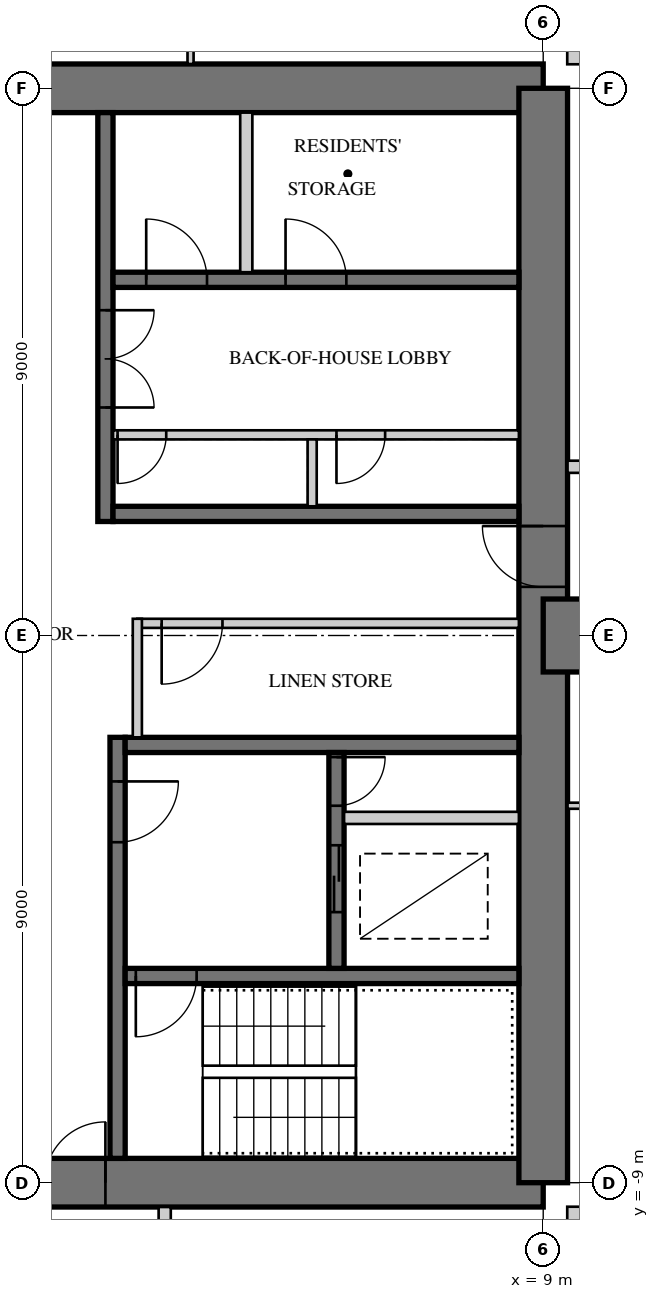
"""IFC4 building model, lengths in metres.
Left out: names, types, materials, properties, quantities, classifications, styles, units other than length and angle.
Written with IfcOpenShell. Run it as: python <this file> out.ifc"""

import sys

from ifc_helpers import new_model, si_unit, direction, frame, frame_2d, origin, place, context, subcontext, project, spatial, rectangle, extrude, element, fill, save


model = new_model("IFC4")
c1 = context("Model", 3, precision=1e-05, world=origin(), true_north=direction((0.0, 1.0)))
c2 = subcontext(c1, "Body", "Model", "MODEL_VIEW")
j1 = project(units=[si_unit("LENGTHUNIT", "METRE"), si_unit("PLANEANGLEUNIT", "RADIAN")], contexts=[c1])
p1 = place(None, origin())
s1 = spatial("IfcSite", under=j1, at=p1, CompositionType="ELEMENT")
p2 = place(p1, origin())
s2 = spatial("IfcBuilding", under=s1, at=p2, CompositionType="ELEMENT")
p3 = place(p2, frame((0.0, 0.0, 222.1)))
s3 = spatial("IfcBuildingStorey", under=s2, at=p3, CompositionType="ELEMENT", Elevation=222.1)
p4 = place(p3, frame((9.0, 9.0, 0.0), z_axis=(0.0, 0.0, 1.0), x_axis=(-1.0, 0.0, 0.0)))
e1 = element("IfcWall", 1, at=p4, inside=s3, PredefinedType="SHEAR", context=c2, shape_type="SweptSolid", body=[
    extrude(rectangle(XDim=18.0, YDim=0.8, at=frame_2d((9.0, 0.0))), origin(), (0.0, 0.0, 1.0), 3.4),
])
p5 = place(p4, frame((9.8, 0.0, 0.0)))
e2 = element("IfcOpeningElement", 2, at=p5, cuts=e1, PredefinedType="OPENING", context=c2, shape_type="SweptSolid", body=[
    extrude(rectangle(XDim=1.0, YDim=2.4, at=frame_2d((0.5, 1.2))), frame((0.0, 0.41, 0.0), z_axis=(0.0, -1.0, 0.0), x_axis=(1.0, 0.0, 0.0)), (0.0, 0.0, 1.0), 0.82),
])
p6 = place(p3, frame((-9.0, -9.0, 0.0), z_axis=(0.0, 0.0, 1.0), x_axis=(1.0, 0.0, 0.0)))
e3 = element("IfcWall", 3, at=p6, inside=s3, PredefinedType="SHEAR", context=c2, shape_type="SweptSolid", body=[
    extrude(rectangle(XDim=18.0, YDim=0.8, at=frame_2d((9.0, 0.0))), origin(), (0.0, 0.0, 1.0), 3.4),
])
p7 = place(p6, frame((9.8, 0.0, 0.0)))
e4 = element("IfcOpeningElement", 4, at=p7, cuts=e3, PredefinedType="OPENING", context=c2, shape_type="SweptSolid", body=[
    extrude(rectangle(XDim=1.0, YDim=2.4, at=frame_2d((0.5, 1.2))), frame((0.0, 0.41, 0.0), z_axis=(0.0, -1.0, 0.0), x_axis=(1.0, 0.0, 0.0)), (0.0, 0.0, 1.0), 0.82),
])
p8 = place(p3, frame((9.0, -9.0, 0.0), z_axis=(0.0, 0.0, 1.0), x_axis=(0.0, 1.0, 0.0)))
e5 = element("IfcWall", 5, at=p8, inside=s3, PredefinedType="SHEAR", context=c2, shape_type="SweptSolid", body=[
    extrude(rectangle(XDim=18.0, YDim=0.8, at=frame_2d((9.0, 0.0))), origin(), (0.0, 0.0, 1.0), 3.4),
])
p9 = place(p8, frame((9.8, 0.0, 0.0)))
e6 = element("IfcOpeningElement", 6, at=p9, cuts=e5, PredefinedType="OPENING", context=c2, shape_type="SweptSolid", body=[
    extrude(rectangle(XDim=1.0, YDim=2.4, at=frame_2d((0.5, 1.2))), frame((0.0, 0.41, 0.0), z_axis=(0.0, -1.0, 0.0), x_axis=(1.0, 0.0, 0.0)), (0.0, 0.0, 1.0), 0.82),
])
p10 = place(p3, frame((1.8, 1.875, 0.0), z_axis=(0.0, 0.0, 1.0), x_axis=(0.0, 1.0, 0.0)))
e7 = element("IfcWall", 7, at=p10, inside=s3, PredefinedType="SHEAR", context=c2, shape_type="SweptSolid", body=[
    extrude(rectangle(XDim=6.725, YDim=0.25, at=frame_2d((3.363, 0.0))), origin(), (0.0, 0.0, 1.0), 3.4),
])
p11 = place(p10, frame((1.875, 0.0, 0.0)))
e8 = element("IfcOpeningElement", 8, at=p11, cuts=e7, PredefinedType="OPENING", context=c2, shape_type="SweptSolid", body=[
    extrude(rectangle(XDim=1.6, YDim=2.4, at=frame_2d((0.8, 1.2))), frame((0.0, 0.135, 0.0), z_axis=(0.0, -1.0, 0.0), x_axis=(1.0, 0.0, 0.0)), (0.0, 0.0, 1.0), 0.27),
])
p12 = place(p3, frame((1.925, 2.0, 0.0), z_axis=(0.0, 0.0, 1.0), x_axis=(1.0, 0.0, 0.0)))
e9 = element("IfcWall", 9, at=p12, inside=s3, PredefinedType="SHEAR", context=c2, shape_type="SweptSolid", body=[
    extrude(rectangle(XDim=6.675, YDim=0.25, at=frame_2d((3.337, 0.0))), origin(), (0.0, 0.0, 1.0), 3.4),
])
p13 = place(p3, frame((1.925, 5.85, 0.0), z_axis=(0.0, 0.0, 1.0), x_axis=(1.0, 0.0, 0.0)))
e10 = element("IfcWall", 10, at=p13, inside=s3, PredefinedType="SHEAR", context=c2, shape_type="SweptSolid", body=[
    extrude(rectangle(XDim=6.675, YDim=0.25, at=frame_2d((3.337, 0.0))), origin(), (0.0, 0.0, 1.0), 3.4),
])
p14 = place(p13, frame((0.546, 0.0, 0.0)))
e11 = element("IfcOpeningElement", 11, at=p14, cuts=e10, PredefinedType="OPENING", context=c2, shape_type="SweptSolid", body=[
    extrude(rectangle(XDim=1.0, YDim=2.1, at=frame_2d((0.5, 1.05))), frame((0.0, 0.135, 0.0), z_axis=(0.0, -1.0, 0.0), x_axis=(1.0, 0.0, 0.0)), (0.0, 0.0, 1.0), 0.27),
])
p15 = place(p13, frame((2.837, 0.0, 0.0)))
e12 = element("IfcOpeningElement", 12, at=p15, cuts=e10, PredefinedType="OPENING", context=c2, shape_type="SweptSolid", body=[
    extrude(rectangle(XDim=1.0, YDim=2.1, at=frame_2d((0.5, 1.05))), frame((0.0, 0.135, 0.0), z_axis=(0.0, -1.0, 0.0), x_axis=(1.0, 0.0, 0.0)), (0.0, 0.0, 1.0), 0.27),
])
p16 = place(p3, frame((1.925, 3.3, 0.0), z_axis=(0.0, 0.0, 1.0), x_axis=(1.0, 0.0, 0.0)))
e13 = element("IfcWall", 13, at=p16, inside=s3, PredefinedType="PARTITIONING", context=c2, shape_type="SweptSolid", body=[
    extrude(rectangle(XDim=6.675, YDim=0.15, at=frame_2d((3.337, 0.0))), origin(), (0.0, 0.0, 1.0), 3.4),
])
p17 = place(p16, frame((0.075, 0.0, 0.0)))
e14 = element("IfcOpeningElement", 14, at=p17, cuts=e13, PredefinedType="OPENING", context=c2, shape_type="SweptSolid", body=[
    extrude(rectangle(XDim=0.8, YDim=2.1, at=frame_2d((0.4, 1.05))), frame((0.0, 0.085, 0.0), z_axis=(0.0, -1.0, 0.0), x_axis=(1.0, 0.0, 0.0)), (0.0, 0.0, 1.0), 0.17),
])
p18 = place(p16, frame((3.675, 0.0, 0.0)))
e15 = element("IfcOpeningElement", 15, at=p18, cuts=e13, PredefinedType="OPENING", context=c2, shape_type="SweptSolid", body=[
    extrude(rectangle(XDim=0.8, YDim=2.1, at=frame_2d((0.4, 1.05))), frame((0.0, 0.085, 0.0), z_axis=(0.0, -1.0, 0.0), x_axis=(1.0, 0.0, 0.0)), (0.0, 0.0, 1.0), 0.17),
])
p19 = place(p3, frame((5.2, 2.125, 0.0), z_axis=(0.0, 0.0, 1.0), x_axis=(0.0, 1.0, 0.0)))
e16 = element("IfcWall", 16, at=p19, inside=s3, PredefinedType="PARTITIONING", context=c2, shape_type="SweptSolid", body=[
    extrude(rectangle(XDim=1.1, YDim=0.15, at=frame_2d((0.55, 0.0))), origin(), (0.0, 0.0, 1.0), 3.4),
])
p20 = place(p3, frame((4.117, 5.975, 0.0), z_axis=(0.0, 0.0, 1.0), x_axis=(0.0, 1.0, 0.0)))
e17 = element("IfcWall", 17, at=p20, inside=s3, PredefinedType="PARTITIONING", context=c2, shape_type="SweptSolid", body=[
    extrude(rectangle(XDim=2.625, YDim=0.2, at=frame_2d((1.312, 0.0))), origin(), (0.0, 0.0, 1.0), 3.4),
])
p21 = place(p3, frame((2.0, -1.675, 0.0), z_axis=(0.0, 0.0, 1.0), x_axis=(0.0, -1.0, 0.0)))
e18 = element("IfcWall", 18, at=p21, inside=s3, PredefinedType="SHEAR", context=c2, shape_type="SweptSolid", body=[
    extrude(rectangle(XDim=6.925, YDim=0.25, at=frame_2d((3.462, 0.0))), origin(), (0.0, 0.0, 1.0), 3.4),
])
p22 = place(p21, frame((0.725, 0.0, 0.0)))
e19 = element("IfcOpeningElement", 19, at=p22, cuts=e18, PredefinedType="OPENING", context=c2, shape_type="SweptSolid", body=[
    extrude(rectangle(XDim=1.0, YDim=2.1, at=frame_2d((0.5, 1.05))), frame((0.0, 0.135, 0.0), z_axis=(0.0, -1.0, 0.0), x_axis=(1.0, 0.0, 0.0)), (0.0, 0.0, 1.0), 0.27),
])
p23 = place(p3, frame((2.125, -1.8, 0.0), z_axis=(0.0, 0.0, 1.0), x_axis=(1.0, 0.0, 0.0)))
e20 = element("IfcWall", 20, at=p23, inside=s3, PredefinedType="SHEAR", context=c2, shape_type="SweptSolid", body=[
    extrude(rectangle(XDim=6.475, YDim=0.25, at=frame_2d((3.238, 0.0))), origin(), (0.0, 0.0, 1.0), 3.4),
])
p24 = place(p3, frame((2.125, -5.6, 0.0), z_axis=(0.0, 0.0, 1.0), x_axis=(1.0, 0.0, 0.0)))
e21 = element("IfcWall", 21, at=p24, inside=s3, PredefinedType="SHEAR", context=c2, shape_type="SweptSolid", body=[
    extrude(rectangle(XDim=6.475, YDim=0.25, at=frame_2d((3.238, 0.0))), origin(), (0.0, 0.0, 1.0), 3.4),
])
p25 = place(p24, frame((0.175, 0.0, 0.0)))
e22 = element("IfcOpeningElement", 22, at=p25, cuts=e21, PredefinedType="OPENING", context=c2, shape_type="SweptSolid", body=[
    extrude(rectangle(XDim=1.0, YDim=2.1, at=frame_2d((0.5, 1.05))), frame((0.0, 0.135, 0.0), z_axis=(0.0, -1.0, 0.0), x_axis=(1.0, 0.0, 0.0)), (0.0, 0.0, 1.0), 0.27),
])
p26 = place(p3, frame((5.6, -1.925, 0.0), z_axis=(0.0, 0.0, 1.0), x_axis=(0.0, -1.0, 0.0)))
e23 = element("IfcWall", 23, at=p26, inside=s3, PredefinedType="SHEAR", context=c2, shape_type="SweptSolid", body=[
    extrude(rectangle(XDim=3.55, YDim=0.25, at=frame_2d((1.775, 0.0))), origin(), (0.0, 0.0, 1.0), 3.4),
])
p27 = place(p26, frame((1.525, 0.0, 0.0)))
e24 = element("IfcOpeningElement", 24, at=p27, cuts=e23, PredefinedType="OPENING", context=c2, shape_type="SweptSolid", body=[
    extrude(rectangle(XDim=1.1, YDim=2.2, at=frame_2d((0.55, 1.1))), frame((0.0, 0.135, 0.0), z_axis=(0.0, -1.0, 0.0), x_axis=(1.0, 0.0, 0.0)), (0.0, 0.0, 1.0), 0.27),
])
p28 = place(p26, frame((0.075, 0.0, 0.0)))
e25 = element("IfcOpeningElement", 25, at=p28, cuts=e23, PredefinedType="OPENING", context=c2, shape_type="SweptSolid", body=[
    extrude(rectangle(XDim=0.8, YDim=2.1, at=frame_2d((0.4, 1.05))), frame((0.0, 0.135, 0.0), z_axis=(0.0, -1.0, 0.0), x_axis=(1.0, 0.0, 0.0)), (0.0, 0.0, 1.0), 0.27),
])
p29 = place(p3, frame((5.725, -3.0, 0.0), z_axis=(0.0, 0.0, 1.0), x_axis=(1.0, 0.0, 0.0)))
e26 = element("IfcWall", 26, at=p29, inside=s3, PredefinedType="PARTITIONING", context=c2, shape_type="SweptSolid", body=[
    extrude(rectangle(XDim=2.875, YDim=0.2, at=frame_2d((1.438, 0.0))), origin(), (0.0, 0.0, 1.0), 3.4),
])
p30 = place(p3, frame((9.0, 0.0, 0.0), z_axis=(0.0, 0.0, 1.0), x_axis=(1.0, 0.0, 0.0)))
e27 = element("IfcWall", 27, at=p30, inside=s3, PredefinedType="SHEAR", context=c2, shape_type="SweptSolid", body=[
    extrude(rectangle(XDim=9.0, YDim=1.2, at=frame_2d((4.5, 0.0))), origin(), (0.0, 0.0, 1.0), 3.4),
])
p31 = place(p30, frame((3.8, 0.0, 0.0)))
e28 = element("IfcOpeningElement", 28, at=p31, cuts=e27, PredefinedType="OPENING", context=c2, shape_type="SweptSolid", body=[
    extrude(rectangle(XDim=1.0, YDim=2.15, at=frame_2d((0.5, 1.075))), frame((0.0, 0.61, 0.0), z_axis=(0.0, -1.0, 0.0), x_axis=(1.0, 0.0, 0.0)), (0.0, 0.0, 1.0), 1.22),
])
p32 = place(p30, frame((7.0, 0.0, 0.0)))
e29 = element("IfcOpeningElement", 29, at=p32, cuts=e27, PredefinedType="OPENING", context=c2, shape_type="SweptSolid", body=[
    extrude(rectangle(XDim=1.0, YDim=2.2, at=frame_2d((0.5, 1.1))), frame((0.0, 0.61, 0.0), z_axis=(0.0, -1.0, 0.0), x_axis=(1.0, 0.0, 0.0)), (0.0, 0.0, 1.0), 1.22),
])
p33 = place(p3, frame((9.395, -9.52, 0.0), z_axis=(0.0, 0.0, 1.0), x_axis=(1.0, 0.0, 0.0)))
e30 = element("IfcWall", 30, at=p33, inside=s3, PredefinedType="SOLIDWALL", context=c2, shape_type="SweptSolid", body=[
    extrude(rectangle(XDim=3.125, YDim=0.25, at=frame_2d((1.562, 0.0))), origin(), (0.0, 0.0, 1.0), 3.22),
])
p34 = place(p33, frame((0.6, 0.0, 0.0)))
e31 = element("IfcOpeningElement", 31, at=p34, cuts=e30, PredefinedType="OPENING", context=c2, shape_type="SweptSolid", body=[
    extrude(rectangle(XDim=1.0, YDim=2.2, at=frame_2d((0.5, 1.1))), frame((0.0, 0.135, 0.0), z_axis=(0.0, -1.0, 0.0), x_axis=(1.0, 0.0, 0.0)), (0.0, 0.0, 1.0), 0.27),
])
p35 = place(p3, frame((9.52, 9.395, 0.0), z_axis=(0.0, 0.0, 1.0), x_axis=(0.0, 1.0, 0.0)))
e32 = element("IfcWall", 32, at=p35, inside=s3, PredefinedType="SOLIDWALL", context=c2, shape_type="SweptSolid", body=[
    extrude(rectangle(XDim=3.125, YDim=0.25, at=frame_2d((1.562, 0.0))), origin(), (0.0, 0.0, 1.0), 3.22),
])
p36 = place(p35, frame((0.6, 0.0, 0.0)))
e33 = element("IfcOpeningElement", 33, at=p36, cuts=e32, PredefinedType="OPENING", context=c2, shape_type="SweptSolid", body=[
    extrude(rectangle(XDim=1.0, YDim=2.2, at=frame_2d((0.5, 1.1))), frame((0.0, 0.135, 0.0), z_axis=(0.0, -1.0, 0.0), x_axis=(1.0, 0.0, 0.0)), (0.0, 0.0, 1.0), 0.27),
])
p37 = place(p3, frame((2.325, 0.2, 0.0), z_axis=(0.0, 0.0, 1.0), x_axis=(1.0, 0.0, 0.0)))
e34 = element("IfcWall", 34, at=p37, inside=s3, PredefinedType="PARTITIONING", context=c2, shape_type="SweptSolid", body=[
    extrude(rectangle(XDim=6.275, YDim=0.15, at=frame_2d((3.138, 0.0))), origin(), (0.0, 0.0, 1.0), 3.22),
])
p38 = place(p37, frame((0.4, 0.0, 0.0)))
e35 = element("IfcOpeningElement", 35, at=p38, cuts=e34, PredefinedType="OPENING", context=c2, shape_type="SweptSolid", body=[
    extrude(rectangle(XDim=1.0, YDim=2.1, at=frame_2d((0.5, 1.05))), frame((0.0, 0.085, 0.0), z_axis=(0.0, -1.0, 0.0), x_axis=(1.0, 0.0, 0.0)), (0.0, 0.0, 1.0), 0.17),
])
p39 = place(p3, frame((2.325, -1.675, 0.0), z_axis=(0.0, 0.0, 1.0), x_axis=(0.0, 1.0, 0.0)))
e36 = element("IfcWall", 36, at=p39, inside=s3, PredefinedType="PARTITIONING", context=c2, shape_type="SweptSolid", body=[
    extrude(rectangle(XDim=1.95, YDim=0.15, at=frame_2d((0.975, 0.0))), origin(), (0.0, 0.0, 1.0), 3.22),
])
p40 = place(p3, frame((3.2, 9.4, 0.0), z_axis=(0.0, 0.0, 1.0), x_axis=(0.0, 1.0, 0.0)))
e37 = element("IfcWall", 37, at=p40, inside=s3, PredefinedType="PARTITIONING", context=c2, shape_type="SweptSolid", body=[
    extrude(rectangle(XDim=2.85, YDim=0.1, at=frame_2d((1.425, 0.0))), origin(), (0.0, 0.0, 1.0), 3.22),
])
p41 = place(p3, frame((9.4, -2.8, 0.0), z_axis=(0.0, 0.0, 1.0), x_axis=(1.0, 0.0, 0.0)))
e38 = element("IfcWall", 38, at=p41, inside=s3, PredefinedType="PARTITIONING", context=c2, shape_type="SweptSolid", body=[
    extrude(rectangle(XDim=2.65, YDim=0.1, at=frame_2d((1.325, 0.0))), origin(), (0.0, 0.0, 1.0), 3.22),
])
p42 = place(p3, frame((9.4, 2.775, 0.0), z_axis=(0.0, 0.0, 1.0), x_axis=(1.0, 0.0, 0.0)))
e39 = element("IfcWall", 39, at=p42, inside=s3, PredefinedType="SOLIDWALL", context=c2, shape_type="SweptSolid", body=[
    extrude(rectangle(XDim=5.6, YDim=0.2, at=frame_2d((2.8, 0.0))), origin(), (0.0, 0.0, 1.0), 3.22),
])
p43 = place(p42, frame((1.2, 0.0, 0.0)))
e40 = element("IfcOpeningElement", 40, at=p43, cuts=e39, PredefinedType="OPENING", context=c2, shape_type="SweptSolid", body=[
    extrude(rectangle(XDim=1.0, YDim=2.2, at=frame_2d((0.5, 1.1))), frame((0.0, 0.11, 0.0), z_axis=(0.0, -1.0, 0.0), x_axis=(1.0, 0.0, 0.0)), (0.0, 0.0, 1.0), 0.22),
])
p44 = place(p3, frame((2.775, -9.4, 0.0), z_axis=(0.0, 0.0, 1.0), x_axis=(0.0, -1.0, 0.0)))
e41 = element("IfcWall", 41, at=p44, inside=s3, PredefinedType="SOLIDWALL", context=c2, shape_type="SweptSolid", body=[
    extrude(rectangle(XDim=5.6, YDim=0.2, at=frame_2d((2.8, 0.0))), origin(), (0.0, 0.0, 1.0), 3.22),
])
p45 = place(p44, frame((1.2, 0.0, 0.0)))
e42 = element("IfcOpeningElement", 42, at=p45, cuts=e41, PredefinedType="OPENING", context=c2, shape_type="SweptSolid", body=[
    extrude(rectangle(XDim=1.0, YDim=2.2, at=frame_2d((0.5, 1.1))), frame((0.0, 0.11, 0.0), z_axis=(0.0, -1.0, 0.0), x_axis=(1.0, 0.0, 0.0)), (0.0, 0.0, 1.0), 0.22),
])
p46 = place(p38, frame((1.0, 0.0, 0.0), z_axis=(0.0, 0.0, 1.0), x_axis=(-1.0, 0.0, 0.0)))
e43 = element("IfcDoor", 43, at=p46, inside=s3, OperationType="SINGLE_SWING_RIGHT", PredefinedType="DOOR", context=c2, shape_type="SweptSolid", body=[
    extrude(rectangle(XDim=1.0, YDim=2.1, at=frame_2d((0.5, 1.05))), frame((0.0, 0.025, 0.0), z_axis=(0.0, -1.0, 0.0), x_axis=(1.0, 0.0, 0.0)), (0.0, 0.0, 1.0), 0.05),
])
fill(e35, e43)
p47 = place(p7, origin())
e44 = element("IfcDoor", 44, at=p47, inside=s3, OperationType="SINGLE_SWING_RIGHT", PredefinedType="DOOR", context=c2, shape_type="SweptSolid", body=[
    extrude(rectangle(XDim=1.0, YDim=2.4, at=frame_2d((0.5, 1.2))), frame((0.0, 0.055, 0.0), z_axis=(0.0, -1.0, 0.0), x_axis=(1.0, 0.0, 0.0)), (0.0, 0.0, 1.0), 0.05),
])
fill(e4, e44)
p48 = place(p9, origin())
e45 = element("IfcDoor", 45, at=p48, inside=s3, OperationType="SINGLE_SWING_RIGHT", PredefinedType="DOOR", context=c2, shape_type="SweptSolid", body=[
    extrude(rectangle(XDim=1.0, YDim=2.4, at=frame_2d((0.5, 1.2))), frame((0.0, 0.055, 0.0), z_axis=(0.0, -1.0, 0.0), x_axis=(1.0, 0.0, 0.0)), (0.0, 0.0, 1.0), 0.05),
])
fill(e6, e45)
p49 = place(p11, frame((1.6, 0.0, 0.0), z_axis=(0.0, 0.0, 1.0), x_axis=(-1.0, 0.0, 0.0)))
e46 = element("IfcDoor", 46, at=p49, inside=s3, OperationType="DOUBLE_DOOR_SINGLE_SWING", PredefinedType="DOOR", context=c2, shape_type="SweptSolid", body=[
    extrude(rectangle(XDim=1.6, YDim=2.4, at=frame_2d((0.8, 1.2))), frame((0.0, 0.025, 0.0), z_axis=(0.0, -1.0, 0.0), x_axis=(1.0, 0.0, 0.0)), (0.0, 0.0, 1.0), 0.05),
])
fill(e8, e46)
p50 = place(p17, frame((0.8, 0.0, 0.0), z_axis=(0.0, 0.0, 1.0), x_axis=(-1.0, 0.0, 0.0)))
e47 = element("IfcDoor", 47, at=p50, inside=s3, OperationType="SINGLE_SWING_RIGHT", PredefinedType="DOOR", context=c2, shape_type="SweptSolid", body=[
    extrude(rectangle(XDim=0.8, YDim=2.1, at=frame_2d((0.4, 1.05))), frame((0.0, 0.025, 0.0), z_axis=(0.0, -1.0, 0.0), x_axis=(1.0, 0.0, 0.0)), (0.0, 0.0, 1.0), 0.05),
])
fill(e14, e47)
p51 = place(p18, frame((0.8, 0.0, 0.0), z_axis=(0.0, 0.0, 1.0), x_axis=(-1.0, 0.0, 0.0)))
e48 = element("IfcDoor", 48, at=p51, inside=s3, OperationType="SINGLE_SWING_RIGHT", PredefinedType="DOOR", context=c2, shape_type="SweptSolid", body=[
    extrude(rectangle(XDim=0.8, YDim=2.1, at=frame_2d((0.4, 1.05))), frame((0.0, 0.025, 0.0), z_axis=(0.0, -1.0, 0.0), x_axis=(1.0, 0.0, 0.0)), (0.0, 0.0, 1.0), 0.05),
])
fill(e15, e48)
p52 = place(p22, origin())
e49 = element("IfcDoor", 49, at=p52, inside=s3, OperationType="SINGLE_SWING_LEFT", PredefinedType="DOOR", context=c2, shape_type="SweptSolid", body=[
    extrude(rectangle(XDim=1.0, YDim=2.1, at=frame_2d((0.5, 1.05))), frame((0.0, 0.025, 0.0), z_axis=(0.0, -1.0, 0.0), x_axis=(1.0, 0.0, 0.0)), (0.0, 0.0, 1.0), 0.05),
])
fill(e19, e49)
p53 = place(p25, frame((1.0, 0.0, 0.0), z_axis=(0.0, 0.0, 1.0), x_axis=(-1.0, 0.0, 0.0)))
e50 = element("IfcDoor", 50, at=p53, inside=s3, OperationType="SINGLE_SWING_RIGHT", PredefinedType="DOOR", context=c2, shape_type="SweptSolid", body=[
    extrude(rectangle(XDim=1.0, YDim=2.1, at=frame_2d((0.5, 1.05))), frame((0.0, 0.025, 0.0), z_axis=(0.0, -1.0, 0.0), x_axis=(1.0, 0.0, 0.0)), (0.0, 0.0, 1.0), 0.05),
])
fill(e22, e50)
p54 = place(p27, origin())
e51 = element("IfcDoor", 51, at=p54, inside=s3, OperationType="DOUBLE_DOOR_SLIDING", PredefinedType="DOOR", context=c2, shape_type="SweptSolid", body=[
    extrude(rectangle(XDim=1.1, YDim=2.2, at=frame_2d((0.55, 1.1))), frame((0.0, 0.025, 0.0), z_axis=(0.0, -1.0, 0.0), x_axis=(1.0, 0.0, 0.0)), (0.0, 0.0, 1.0), 0.05),
])
fill(e24, e51)
p55 = place(p28, origin())
e52 = element("IfcDoor", 52, at=p55, inside=s3, OperationType="SINGLE_SWING_LEFT", PredefinedType="DOOR", context=c2, shape_type="SweptSolid", body=[
    extrude(rectangle(XDim=0.8, YDim=2.1, at=frame_2d((0.4, 1.05))), frame((0.0, 0.025, 0.0), z_axis=(0.0, -1.0, 0.0), x_axis=(1.0, 0.0, 0.0)), (0.0, 0.0, 1.0), 0.05),
])
fill(e25, e52)
p56 = place(p14, origin())
e53 = element("IfcDoor", 53, at=p56, inside=s3, OperationType="SINGLE_SWING_LEFT", PredefinedType="DOOR", context=c2, shape_type="SweptSolid", body=[
    extrude(rectangle(XDim=1.0, YDim=2.1, at=frame_2d((0.5, 1.05))), frame((0.0, 0.025, 0.0), z_axis=(0.0, -1.0, 0.0), x_axis=(1.0, 0.0, 0.0)), (0.0, 0.0, 1.0), 0.05),
])
fill(e11, e53)
p57 = place(p15, origin())
e54 = element("IfcDoor", 54, at=p57, inside=s3, OperationType="SINGLE_SWING_LEFT", PredefinedType="DOOR", context=c2, shape_type="SweptSolid", body=[
    extrude(rectangle(XDim=1.0, YDim=2.1, at=frame_2d((0.5, 1.05))), frame((0.0, 0.025, 0.0), z_axis=(0.0, -1.0, 0.0), x_axis=(1.0, 0.0, 0.0)), (0.0, 0.0, 1.0), 0.05),
])
fill(e12, e54)
save(model, sys.argv[1])
